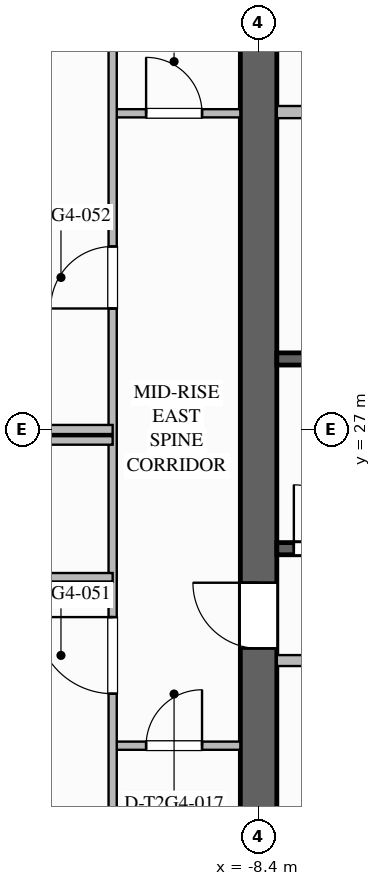
"""IFC4 building model, lengths in metres.
Left out: names, types, materials, properties, quantities, classifications, styles, units other than length and angle.
Written with IfcOpenShell. Run it as: python <this file> out.ifc"""

import sys

from ifc_helpers import new_model, si_unit, direction, frame, frame_2d, origin, place, context, subcontext, project, spatial, rectangle, extrude, element, fill, save


model = new_model("IFC4")
c1 = context("Model", 3, precision=1e-05, world=origin(), true_north=direction((0.0, 1.0)))
c2 = subcontext(c1, "Body", "Model", "MODEL_VIEW")
j1 = project(units=[si_unit("LENGTHUNIT", "METRE"), si_unit("PLANEANGLEUNIT", "RADIAN")], contexts=[c1])
p1 = place(None, origin())
s1 = spatial("IfcSite", under=j1, at=p1, CompositionType="ELEMENT")
p2 = place(p1, origin())
s2 = spatial("IfcBuilding", under=s1, at=p2, CompositionType="ELEMENT")
p3 = place(p2, frame((0.0, 0.0, 123.3)))
s3 = spatial("IfcBuildingStorey", under=s2, at=p3, CompositionType="ELEMENT", Elevation=123.3)
p4 = place(p3, frame((-8.4, 18.9, 0.0), z_axis=(0.0, 0.0, 1.0), x_axis=(0.0, 1.0, 0.0)))
e1 = element("IfcWall", 1, at=p4, inside=s3, PredefinedType="SHEAR", context=c2, shape_type="SweptSolid", body=[
    extrude(rectangle(XDim=16.2, YDim=0.6, at=frame_2d((8.1, 0.0))), origin(), (0.0, 0.0, 1.0), 3.5),
])
p5 = place(p4, frame((4.5, 0.0, 0.0)))
e2 = element("IfcOpeningElement", 2, at=p5, cuts=e1, PredefinedType="OPENING", context=c2, shape_type="SweptSolid", body=[
    extrude(rectangle(XDim=1.08, YDim=2.04, at=frame_2d((0.54, 1.02))), frame((0.0, 0.31, 0.0), z_axis=(0.0, -1.0, 0.0), x_axis=(1.0, 0.0, 0.0)), (0.0, 0.0, 1.0), 0.62),
])
p6 = place(p3, frame((-8.1, 25.04, 0.0), z_axis=(0.0, 0.0, 1.0), x_axis=(1.0, 0.0, 0.0)))
e3 = element("IfcWall", 3, at=p6, inside=s3, PredefinedType="SOLIDWALL", context=c2, shape_type="SweptSolid", body=[
    extrude(rectangle(XDim=8.1, YDim=0.2, at=frame_2d((4.05, 0.0))), origin(), (0.0, 0.0, 1.0), 3.24),
])
p7 = place(p6, frame((0.28, 0.0, 0.0)))
e4 = element("IfcOpeningElement", 4, at=p7, cuts=e3, PredefinedType="OPENING", context=c2, shape_type="SweptSolid", body=[
    extrude(rectangle(XDim=1.05, YDim=2.1, at=frame_2d((0.525, 1.05))), frame((0.0, 0.11, 0.0), z_axis=(0.0, -1.0, 0.0), x_axis=(1.0, 0.0, 0.0)), (0.0, 0.0, 1.0), 0.22),
])
p8 = place(p3, frame((-8.1, 28.16, 0.0), z_axis=(0.0, 0.0, 1.0), x_axis=(1.0, 0.0, 0.0)))
e5 = element("IfcWall", 5, at=p8, inside=s3, PredefinedType="SOLIDWALL", context=c2, shape_type="SweptSolid", body=[
    extrude(rectangle(XDim=8.1, YDim=0.2, at=frame_2d((4.05, 0.0))), origin(), (0.0, 0.0, 1.0), 3.24),
])
p9 = place(p3, frame((-8.1, 32.22, 0.0), z_axis=(0.0, 0.0, 1.0), x_axis=(1.0, 0.0, 0.0)))
e6 = element("IfcWall", 6, at=p9, inside=s3, PredefinedType="SOLIDWALL", context=c2, shape_type="SweptSolid", body=[
    extrude(rectangle(XDim=7.1, YDim=0.2, at=frame_2d((3.55, 0.0))), origin(), (0.0, 0.0, 1.0), 3.24),
])
p10 = place(p3, frame((-8.1, 23.2, 0.0), z_axis=(0.0, 0.0, 1.0), x_axis=(1.0, 0.0, 0.0)))
e7 = element("IfcWall", 7, at=p10, inside=s3, PredefinedType="SOLIDWALL", context=c2, shape_type="SweptSolid", body=[
    extrude(rectangle(XDim=8.65, YDim=0.18, at=frame_2d((4.325, 0.0))), origin(), (0.0, 0.0, 1.0), 3.24),
])
p11 = place(p10, frame((1.6, 0.0, 0.0)))
e8 = element("IfcOpeningElement", 8, at=p11, cuts=e7, PredefinedType="OPENING", context=c2, shape_type="SweptSolid", body=[
    extrude(rectangle(XDim=1.0, YDim=2.1, at=frame_2d((0.5, 1.05))), frame((0.0, 0.1, 0.0), z_axis=(0.0, -1.0, 0.0), x_axis=(1.0, 0.0, 0.0)), (0.0, 0.0, 1.0), 0.2),
])
p12 = place(p10, frame((6.2, 0.0, 0.0)))
e9 = element("IfcOpeningElement", 9, at=p12, cuts=e7, PredefinedType="OPENING", context=c2, shape_type="SweptSolid", body=[
    extrude(rectangle(XDim=1.0, YDim=2.1, at=frame_2d((0.5, 1.05))), frame((0.0, 0.1, 0.0), z_axis=(0.0, -1.0, 0.0), x_axis=(1.0, 0.0, 0.0)), (0.0, 0.0, 1.0), 0.2),
])
p13 = place(p3, frame((-10.8, 21.8, 0.0), z_axis=(0.0, 0.0, 1.0), x_axis=(1.0, 0.0, 0.0)))
e10 = element("IfcWall", 10, at=p13, inside=s3, PredefinedType="PARTITIONING", context=c2, shape_type="SweptSolid", body=[
    extrude(rectangle(XDim=2.1, YDim=0.135, at=frame_2d((1.05, 0.0))), origin(), (0.0, 0.0, 1.0), 3.24),
])
p14 = place(p13, frame((0.55, 0.0, 0.0)))
e11 = element("IfcOpeningElement", 11, at=p14, cuts=e10, PredefinedType="OPENING", context=c2, shape_type="SweptSolid", body=[
    extrude(rectangle(XDim=0.92, YDim=2.1, at=frame_2d((0.46, 1.05))), frame((0.0, 0.077, 0.0), z_axis=(0.0, -1.0, 0.0), x_axis=(1.0, 0.0, 0.0)), (0.0, 0.0, 1.0), 0.155),
])
p15 = place(p3, frame((-10.8, 32.2, 0.0), z_axis=(0.0, 0.0, 1.0), x_axis=(1.0, 0.0, 0.0)))
e12 = element("IfcWall", 12, at=p15, inside=s3, PredefinedType="PARTITIONING", context=c2, shape_type="SweptSolid", body=[
    extrude(rectangle(XDim=2.1, YDim=0.135, at=frame_2d((1.05, 0.0))), origin(), (0.0, 0.0, 1.0), 3.24),
])
p16 = place(p15, frame((0.55, 0.0, 0.0)))
e13 = element("IfcOpeningElement", 13, at=p16, cuts=e12, PredefinedType="OPENING", context=c2, shape_type="SweptSolid", body=[
    extrude(rectangle(XDim=0.92, YDim=2.1, at=frame_2d((0.46, 1.05))), frame((0.0, 0.077, 0.0), z_axis=(0.0, -1.0, 0.0), x_axis=(1.0, 0.0, 0.0)), (0.0, 0.0, 1.0), 0.155),
])
p17 = place(p3, frame((-10.8, 18.3, 0.0), z_axis=(0.0, 0.0, 1.0), x_axis=(0.0, 1.0, 0.0)))
e14 = element("IfcWall", 14, at=p17, inside=s3, PredefinedType="PARTITIONING", context=c2, shape_type="SweptSolid", body=[
    extrude(rectangle(XDim=17.4, YDim=0.135, at=frame_2d((8.7, 0.0))), origin(), (0.0, 0.0, 1.0), 3.24),
])
p18 = place(p17, frame((4.355, 0.0, 0.0)))
e15 = element("IfcOpeningElement", 15, at=p18, cuts=e14, PredefinedType="OPENING", context=c2, shape_type="SweptSolid", body=[
    extrude(rectangle(XDim=1.26, YDim=2.2, at=frame_2d((0.63, 1.1))), frame((0.0, 0.077, 0.0), z_axis=(0.0, -1.0, 0.0), x_axis=(1.0, 0.0, 0.0)), (0.0, 0.0, 1.0), 0.155),
])
p19 = place(p17, frame((10.69, 0.0, 0.0)))
e16 = element("IfcOpeningElement", 16, at=p19, cuts=e14, PredefinedType="OPENING", context=c2, shape_type="SweptSolid", body=[
    extrude(rectangle(XDim=1.02, YDim=2.15, at=frame_2d((0.51, 1.075))), frame((0.0, 0.077, 0.0), z_axis=(0.0, -1.0, 0.0), x_axis=(1.0, 0.0, 0.0)), (0.0, 0.0, 1.0), 0.155),
])
p20 = place(p3, frame((-26.2, 27.0, 0.0), z_axis=(0.0, 0.0, 1.0), x_axis=(1.0, 0.0, 0.0)))
e17 = element("IfcWall", 17, at=p20, inside=s3, PredefinedType="PARTITIONING", context=c2, shape_type="SweptSolid", body=[
    extrude(rectangle(XDim=15.4, YDim=0.15, at=frame_2d((7.7, 0.0))), origin(), (0.0, 0.0, 1.0), 2.53),
])
p21 = place(p3, frame((-10.8, 24.57, 0.0), z_axis=(0.0, 0.0, 1.0), x_axis=(-1.0, 0.0, 0.0)))
e18 = element("IfcWall", 18, at=p21, inside=s3, PredefinedType="PLUMBINGWALL", context=c2, shape_type="SweptSolid", body=[
    extrude(rectangle(XDim=2.15, YDim=0.14, at=frame_2d((1.075, 0.0))), origin(), (0.0, 0.0, 1.0), 3.24),
])
p22 = place(p3, frame((-10.8, 26.82, 0.0), z_axis=(0.0, 0.0, 1.0), x_axis=(-1.0, 0.0, 0.0)))
e19 = element("IfcWall", 19, at=p22, inside=s3, PredefinedType="PLUMBINGWALL", context=c2, shape_type="SweptSolid", body=[
    extrude(rectangle(XDim=2.15, YDim=0.14, at=frame_2d((1.075, 0.0))), origin(), (0.0, 0.0, 1.0), 2.617),
])
p23 = place(p7, origin())
e20 = element("IfcDoor", 20, at=p23, inside=s3, OperationType="SINGLE_SWING_LEFT", PredefinedType="DOOR", context=c2, shape_type="SweptSolid", body=[
    extrude(rectangle(XDim=1.05, YDim=2.1, at=frame_2d((0.525, 1.05))), frame((0.0, 0.025, 0.0), z_axis=(0.0, -1.0, 0.0), x_axis=(1.0, 0.0, 0.0)), (0.0, 0.0, 1.0), 0.05),
])
fill(e4, e20)
p24 = place(p5, origin())
e21 = element("IfcDoor", 21, at=p24, inside=s3, OperationType="SINGLE_SWING_RIGHT", PredefinedType="DOOR", context=c2, shape_type="SweptSolid", body=[
    extrude(rectangle(XDim=1.08, YDim=2.04, at=frame_2d((0.54, 1.02))), frame((0.0, 0.025, 0.0), z_axis=(0.0, -1.0, 0.0), x_axis=(1.0, 0.0, 0.0)), (0.0, 0.0, 1.0), 0.05),
])
fill(e2, e21)
p25 = place(p14, origin())
e22 = element("IfcDoor", 22, at=p25, inside=s3, OperationType="SINGLE_SWING_RIGHT", PredefinedType="DOOR", context=c2, shape_type="SweptSolid", body=[
    extrude(rectangle(XDim=0.92, YDim=2.1, at=frame_2d((0.46, 1.05))), frame((0.0, 0.025, 0.0), z_axis=(0.0, -1.0, 0.0), x_axis=(1.0, 0.0, 0.0)), (0.0, 0.0, 1.0), 0.05),
])
fill(e11, e22)
p26 = place(p16, origin())
e23 = element("IfcDoor", 23, at=p26, inside=s3, OperationType="SINGLE_SWING_LEFT", PredefinedType="DOOR", context=c2, shape_type="SweptSolid", body=[
    extrude(rectangle(XDim=0.92, YDim=2.1, at=frame_2d((0.46, 1.05))), frame((0.0, 0.025, 0.0), z_axis=(0.0, -1.0, 0.0), x_axis=(1.0, 0.0, 0.0)), (0.0, 0.0, 1.0), 0.05),
])
fill(e13, e23)
p27 = place(p18, origin())
e24 = element("IfcDoor", 24, at=p27, inside=s3, OperationType="SINGLE_SWING_RIGHT", PredefinedType="DOOR", context=c2, shape_type="SweptSolid", body=[
    extrude(rectangle(XDim=1.26, YDim=2.2, at=frame_2d((0.63, 1.1))), frame((0.0, 0.025, 0.0), z_axis=(0.0, -1.0, 0.0), x_axis=(1.0, 0.0, 0.0)), (0.0, 0.0, 1.0), 0.05),
])
fill(e15, e24)
p28 = place(p19, origin())
e25 = element("IfcDoor", 25, at=p28, inside=s3, OperationType="SINGLE_SWING_LEFT", PredefinedType="DOOR", context=c2, shape_type="SweptSolid", body=[
    extrude(rectangle(XDim=1.02, YDim=2.15, at=frame_2d((0.51, 1.075))), frame((0.0, 0.025, 0.0), z_axis=(0.0, -1.0, 0.0), x_axis=(1.0, 0.0, 0.0)), (0.0, 0.0, 1.0), 0.05),
])
fill(e16, e25)
save(model, sys.argv[1])
